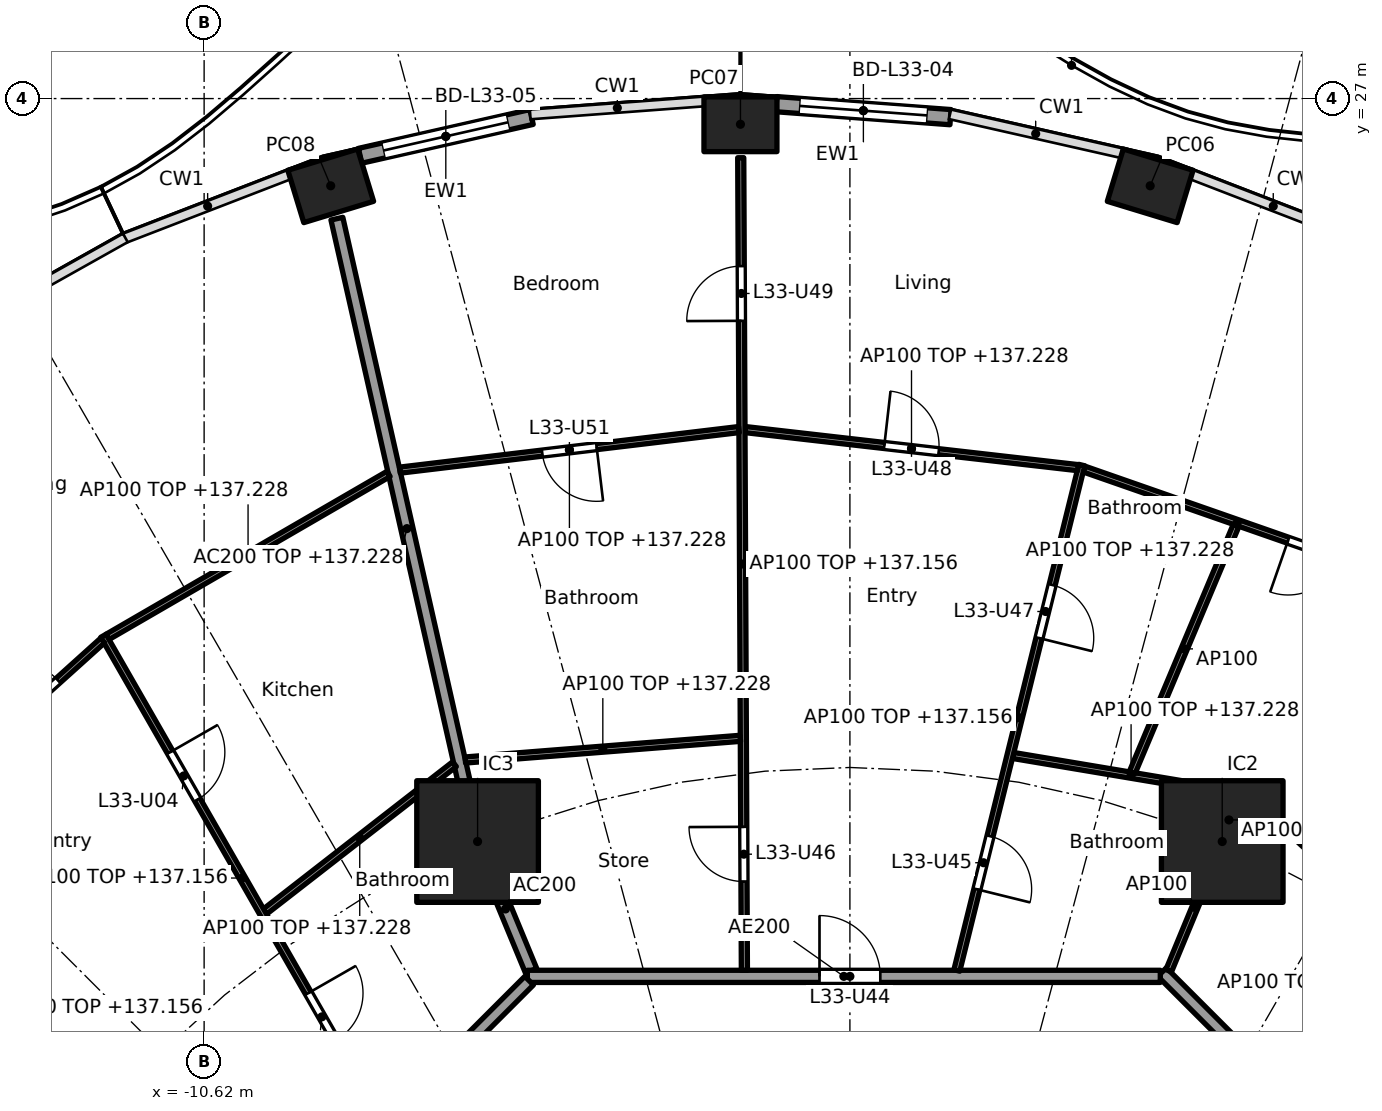
"""IFC4 building model, lengths in metres.
Left out: names, types, materials, properties, quantities, classifications, styles, units other than length and angle.
Written with IfcOpenShell. Run it as: python <this file> out.ifc"""

import sys

from ifc_helpers import new_model, si_unit, direction, frame, frame_2d, origin, origin_2d, place, context, subcontext, project, spatial, rectangle, hollow_rectangle, extrude, element, fill, save


model = new_model("IFC4")
c1 = context("Model", 3, precision=1e-05, world=origin(), true_north=direction((0.0, 1.0)))
c2 = subcontext(c1, "Body", "Model", "MODEL_VIEW")
j1 = project(units=[si_unit("LENGTHUNIT", "METRE"), si_unit("PLANEANGLEUNIT", "RADIAN")], contexts=[c1])
p1 = place(None, origin())
s1 = spatial("IfcSite", under=j1, at=p1, CompositionType="ELEMENT")
p2 = place(p1, origin())
s2 = spatial("IfcBuilding", under=s1, at=p2, CompositionType="ELEMENT")
p3 = place(p2, frame((0.0, 0.0, 134.4)))
s3 = spatial("IfcBuildingStorey", under=s2, at=p3, CompositionType="ELEMENT", Elevation=134.4)
for number, where, z_axis, x_axis in (
    (1, (4.938, 25.565, 0.0), (0.0, 0.0, 1.0), (-0.957, 0.292, 0.0)),
    (2, (-1.8, 26.577, 0.0), (0.0, 0.0, 1.0), (-1.0, 0.0, 0.0)),
    (3, (-8.538, 25.565, 0.0), (0.0, 0.0, 1.0), (-0.957, -0.292, 0.0)),
):
    element("IfcColumn", number, at=place(p3, frame(where, z_axis=z_axis, x_axis=x_axis)), inside=s3, PredefinedType="COLUMN", context=c2, shape_type="SweptSolid", body=[
        extrude(hollow_rectangle(XDim=1.2, YDim=0.9, WallThickness=0.04, at=origin_2d()), origin(), (0.0, 0.0, 1.0), 3.7),
    ])
for number, where, z_axis, x_axis in (
    (4, (6.123, 14.782, 0.0), (0.0, 0.0, 1.0), (1.0, 0.0, 0.0)),
    (5, (-6.123, 14.782, 0.0), (0.0, 0.0, 1.0), (1.0, 0.0, 0.0)),
):
    element("IfcColumn", number, at=place(p3, frame(where, z_axis=z_axis, x_axis=x_axis)), inside=s3, PredefinedType="COLUMN", context=c2, shape_type="SweptSolid", body=[
        extrude(rectangle(XDim=2.0, YDim=2.0, at=origin_2d()), origin(), (0.0, 0.0, 1.0), 3.7),
    ])
p4 = place(p3, frame((-1.211, 26.908, 0.0), z_axis=(0.0, 0.0, 1.0), x_axis=(0.997232166829, -0.074350557769, 0.0)))
e6 = element("IfcWall", 6, at=p4, inside=s3, PredefinedType="SOLIDWALL", context=c2, shape_type="SweptSolid", body=[
    extrude(rectangle(XDim=2.873, YDim=0.25, at=frame_2d((1.437, 0.0))), origin(), (0.0, 0.0, 1.0), 3.44),
])
p5 = place(p4, frame((0.386, 0.0, 0.0)))
e7 = element("IfcOpeningElement", 7, at=p5, cuts=e6, PredefinedType="OPENING", context=c2, shape_type="SweptSolid", body=[
    extrude(rectangle(XDim=2.1, YDim=2.4, at=frame_2d((1.05, 1.2))), frame((0.0, 0.135, 0.0), z_axis=(0.0, -1.0, 0.0), x_axis=(1.0, 0.0, 0.0)), (0.0, 0.0, 1.0), 0.27),
])
p6 = place(p3, frame((-8.055, 26.059, 0.0), z_axis=(0.0, 0.0, 1.0), x_axis=(0.975339035722, 0.220711951186, 0.0)))
e8 = element("IfcWall", 8, at=p6, inside=s3, PredefinedType="SOLIDWALL", context=c2, shape_type="SweptSolid", body=[
    extrude(rectangle(XDim=2.89, YDim=0.25, at=frame_2d((1.445, 0.0))), origin(), (0.0, 0.0, 1.0), 3.44),
])
p7 = place(p6, frame((0.395, 0.0, 0.0)))
e9 = element("IfcOpeningElement", 9, at=p7, cuts=e8, PredefinedType="OPENING", context=c2, shape_type="SweptSolid", body=[
    extrude(rectangle(XDim=2.1, YDim=2.4, at=frame_2d((1.05, 1.2))), frame((0.0, 0.135, 0.0), z_axis=(0.0, -1.0, 0.0), x_axis=(1.0, 0.0, 0.0)), (0.0, 0.0, 1.0), 0.27),
])
p8 = place(p3, frame((-5.243, 12.657, 0.0), z_axis=(0.0, 0.0, 1.0), x_axis=(-0.38273085373, 0.923859888513, 0.0)))
e10 = element("IfcWall", 10, at=p8, inside=s3, PredefinedType="PARTITIONING", context=c2, shape_type="SweptSolid", body=[
    extrude(rectangle(XDim=2.199, YDim=0.2, at=frame_2d((1.1, 0.0))), origin(), (0.0, 0.0, 1.0), 3.44),
])
p9 = place(p3, frame((-6.134, 14.831, 0.0), z_axis=(0.0, 0.0, 1.0), x_axis=(-0.220337590808, 0.975423675167, 0.0)))
e11 = element("IfcWall", 11, at=p9, inside=s3, PredefinedType="PARTITIONING", context=c2, shape_type="SweptSolid", body=[
    extrude(rectangle(XDim=10.451, YDim=0.2, at=frame_2d((5.226, 0.0))), origin(), (0.0, 0.0, 1.0), 2.828),
])
p10 = place(p3, frame((12.635, 5.134, 0.0), z_axis=(0.0, 0.0, 1.0), x_axis=(-0.707106781187, 0.707106781187, 0.0)))
e12 = element("IfcWall", 12, at=p10, inside=s3, PredefinedType="PARTITIONING", context=c2, shape_type="SweptSolid", body=[
    extrude(rectangle(XDim=10.609, YDim=0.2, at=frame_2d((5.305, 0.0))), origin(), (0.0, 0.0, 1.0), 3.44),
])
p11 = place(p3, frame((5.104, 12.565, 0.0), z_axis=(0.0, 0.0, 1.0), x_axis=(-1.0, 0.0, 0.0)))
e13 = element("IfcWall", 13, at=p11, inside=s3, PredefinedType="PARTITIONING", context=c2, shape_type="SweptSolid", body=[
    extrude(rectangle(XDim=10.409, YDim=0.2, at=frame_2d((5.205, 0.0))), origin(), (0.0, 0.0, 1.0), 3.44),
])
p12 = place(p11, frame((4.604, 0.0, 0.0)))
e14 = element("IfcOpeningElement", 14, at=p12, cuts=e13, PredefinedType="OPENING", context=c2, shape_type="SweptSolid", body=[
    extrude(rectangle(XDim=1.0, YDim=2.1, at=frame_2d((0.5, 1.05))), frame((0.0, 0.11, 0.0), z_axis=(0.0, -1.0, 0.0), x_axis=(1.0, 0.0, 0.0)), (0.0, 0.0, 1.0), 0.22),
])
p13 = place(p3, frame((-5.275, 12.494, 0.0), z_axis=(0.0, 0.0, 1.0), x_axis=(-0.707106781187, -0.707106781187, 0.0)))
e15 = element("IfcWall", 15, at=p13, inside=s3, PredefinedType="PARTITIONING", context=c2, shape_type="SweptSolid", body=[
    extrude(rectangle(XDim=10.209, YDim=0.2, at=frame_2d((5.104, 0.0))), origin(), (0.0, 0.0, 1.0), 3.44),
])
p14 = place(p13, frame((4.604, 0.0, 0.0)))
e16 = element("IfcOpeningElement", 16, at=p14, cuts=e15, PredefinedType="OPENING", context=c2, shape_type="SweptSolid", body=[
    extrude(rectangle(XDim=1.0, YDim=2.1, at=frame_2d((0.5, 1.05))), frame((0.0, 0.11, 0.0), z_axis=(0.0, -1.0, 0.0), x_axis=(1.0, 0.0, 0.0)), (0.0, 0.0, 1.0), 0.22),
])
p15 = place(p3, frame((11.029, 11.443, 0.0), z_axis=(0.0, 0.0, 1.0), x_axis=(-0.733121281629, 0.680097924143, 0.0)))
e17 = element("IfcWall", 17, at=p15, inside=s3, PredefinedType="PARTITIONING", context=c2, shape_type="SweptSolid", body=[
    extrude(rectangle(XDim=6.073, YDim=0.1, at=frame_2d((3.037, 0.0))), origin(), (0.0, 0.0, 1.0), 2.828),
])
p16 = place(p15, frame((3.408, 0.0, 0.0)))
e18 = element("IfcOpeningElement", 18, at=p16, cuts=e17, PredefinedType="OPENING", context=c2, shape_type="SweptSolid", body=[
    extrude(rectangle(XDim=0.9, YDim=2.1, at=frame_2d((0.45, 1.05))), frame((0.0, 0.06, 0.0), z_axis=(0.0, -1.0, 0.0), x_axis=(1.0, 0.0, 0.0)), (0.0, 0.0, 1.0), 0.12),
])
p17 = place(p3, frame((5.243, 12.657, 0.0), z_axis=(0.0, 0.0, 1.0), x_axis=(0.382719158442, 0.923864733477, 0.0)))
e19 = element("IfcWall", 19, at=p17, inside=s3, PredefinedType="PARTITIONING", context=c2, shape_type="SweptSolid", body=[
    extrude(rectangle(XDim=2.25, YDim=0.1, at=frame_2d((1.125, 0.0))), origin(), (0.0, 0.0, 1.0), 3.44),
])
p18 = place(p3, frame((6.564, 15.547, 0.0), z_axis=(0.0, 0.0, 1.0), x_axis=(-0.986269521186, 0.165143669511, 0.0)))
e20 = element("IfcWall", 20, at=p18, inside=s3, PredefinedType="PARTITIONING", context=c2, shape_type="SweptSolid", body=[
    extrude(rectangle(XDim=3.934, YDim=0.1, at=frame_2d((1.967, 0.0))), origin(), (0.0, 0.0, 1.0), 2.828),
])
p19 = place(p3, frame((8.894, 19.148, 0.0), z_axis=(0.0, 0.0, 1.0), x_axis=(-0.944182005381, 0.329424256414, 0.0)))
e21 = element("IfcWall", 21, at=p19, inside=s3, PredefinedType="PARTITIONING", context=c2, shape_type="SweptSolid", body=[
    extrude(rectangle(XDim=5.344, YDim=0.1, at=frame_2d((2.672, 0.0))), origin(), (0.0, 0.0, 1.0), 2.828),
])
p20 = place(p19, frame((0.886, 0.0, 0.0)))
e22 = element("IfcOpeningElement", 22, at=p20, cuts=e21, PredefinedType="OPENING", context=c2, shape_type="SweptSolid", body=[
    extrude(rectangle(XDim=0.9, YDim=2.1, at=frame_2d((0.45, 1.05))), frame((0.0, 0.06, 0.0), z_axis=(0.0, -1.0, 0.0), x_axis=(1.0, 0.0, 0.0)), (0.0, 0.0, 1.0), 0.12),
])
p21 = place(p3, frame((4.643, 15.918, 0.0), z_axis=(0.0, 0.0, 1.0), x_axis=(0.387539433367, 0.921853126906, 0.0)))
e23 = element("IfcWall", 23, at=p21, inside=s3, PredefinedType="PARTITIONING", context=c2, shape_type="SweptSolid", body=[
    extrude(rectangle(XDim=4.408, YDim=0.1, at=frame_2d((2.204, 0.0))), origin(), (0.0, 0.0, 1.0), 3.44),
])
p22 = place(p3, frame((1.759, 12.662, 0.0), z_axis=(0.0, 0.0, 1.0), x_axis=(0.239964949221, 0.970781552743, 0.0)))
e24 = element("IfcWall", 24, at=p22, inside=s3, PredefinedType="PARTITIONING", context=c2, shape_type="SweptSolid", body=[
    extrude(rectangle(XDim=8.562, YDim=0.1, at=frame_2d((4.281, 0.0))), origin(), (0.0, 0.0, 1.0), 2.756),
])
p23 = place(p22, frame((1.375, 0.0, 0.0)))
e25 = element("IfcOpeningElement", 25, at=p23, cuts=e24, PredefinedType="OPENING", context=c2, shape_type="SweptSolid", body=[
    extrude(rectangle(XDim=0.9, YDim=2.1, at=frame_2d((0.45, 1.05))), frame((0.0, 0.06, 0.0), z_axis=(0.0, -1.0, 0.0), x_axis=(1.0, 0.0, 0.0)), (0.0, 0.0, 1.0), 0.12),
])
p24 = place(p22, frame((5.631, 0.0, 0.0)))
e26 = element("IfcOpeningElement", 26, at=p24, cuts=e24, PredefinedType="OPENING", context=c2, shape_type="SweptSolid", body=[
    extrude(rectangle(XDim=0.9, YDim=2.1, at=frame_2d((0.45, 1.05))), frame((0.0, 0.06, 0.0), z_axis=(0.0, -1.0, 0.0), x_axis=(1.0, 0.0, 0.0)), (0.0, 0.0, 1.0), 0.12),
])
p25 = place(p3, frame((3.751, 20.93, 0.0), z_axis=(0.0, 0.0, 1.0), x_axis=(-0.993522105273, 0.113639017658, 0.0)))
e27 = element("IfcWall", 27, at=p25, inside=s3, PredefinedType="PARTITIONING", context=c2, shape_type="SweptSolid", body=[
    extrude(rectangle(XDim=5.513, YDim=0.1, at=frame_2d((2.756, 0.0))), origin(), (0.0, 0.0, 1.0), 2.828),
])
p26 = place(p25, frame((2.306, 0.0, 0.0)))
e28 = element("IfcOpeningElement", 28, at=p26, cuts=e27, PredefinedType="OPENING", context=c2, shape_type="SweptSolid", body=[
    extrude(rectangle(XDim=0.9, YDim=2.1, at=frame_2d((0.45, 1.05))), frame((0.0, 0.06, 0.0), z_axis=(0.0, -1.0, 0.0), x_axis=(1.0, 0.0, 0.0)), (0.0, 0.0, 1.0), 0.12),
])
p27 = place(p3, frame((-1.735, 12.665, 0.0), z_axis=(0.0, 0.0, 1.0), x_axis=(-0.004494500855, 0.99998989968, 0.0)))
e29 = element("IfcWall", 29, at=p27, inside=s3, PredefinedType="PARTITIONING", context=c2, shape_type="SweptSolid", body=[
    extrude(rectangle(XDim=13.363, YDim=0.1, at=frame_2d((6.681, 0.0))), origin(), (0.0, 0.0, 1.0), 2.756),
])
p28 = place(p27, frame((1.459, 0.0, 0.0)))
e30 = element("IfcOpeningElement", 30, at=p28, cuts=e29, PredefinedType="OPENING", context=c2, shape_type="SweptSolid", body=[
    extrude(rectangle(XDim=0.9, YDim=2.1, at=frame_2d((0.45, 1.05))), frame((0.0, 0.06, 0.0), z_axis=(0.0, -1.0, 0.0), x_axis=(1.0, 0.0, 0.0)), (0.0, 0.0, 1.0), 0.12),
])
p29 = place(p27, frame((10.68, 0.0, 0.0)))
e31 = element("IfcOpeningElement", 31, at=p29, cuts=e29, PredefinedType="OPENING", context=c2, shape_type="SweptSolid", body=[
    extrude(rectangle(XDim=0.9, YDim=2.1, at=frame_2d((0.45, 1.05))), frame((0.0, 0.06, 0.0), z_axis=(0.0, -1.0, 0.0), x_axis=(1.0, 0.0, 0.0)), (0.0, 0.0, 1.0), 0.12),
])
p30 = place(p3, frame((-1.802, 16.479, 0.0), z_axis=(0.0, 0.0, 1.0), x_axis=(-0.996907698294, -0.078581429625, 0.0)))
e32 = element("IfcWall", 32, at=p30, inside=s3, PredefinedType="PARTITIONING", context=c2, shape_type="SweptSolid", body=[
    extrude(rectangle(XDim=4.536, YDim=0.1, at=frame_2d((2.268, 0.0))), origin(), (0.0, 0.0, 1.0), 2.828),
])
p31 = place(p3, frame((-1.825, 21.557, 0.0), z_axis=(0.0, 0.0, 1.0), x_axis=(-0.992915053711, -0.11882632753, 0.0)))
e33 = element("IfcWall", 33, at=p31, inside=s3, PredefinedType="PARTITIONING", context=c2, shape_type="SweptSolid", body=[
    extrude(rectangle(XDim=5.615, YDim=0.1, at=frame_2d((2.808, 0.0))), origin(), (0.0, 0.0, 1.0), 2.828),
])
p32 = place(p31, frame((2.358, 0.0, 0.0)))
e34 = element("IfcOpeningElement", 34, at=p32, cuts=e33, PredefinedType="OPENING", context=c2, shape_type="SweptSolid", body=[
    extrude(rectangle(XDim=0.9, YDim=2.1, at=frame_2d((0.45, 1.05))), frame((0.0, 0.06, 0.0), z_axis=(0.0, -1.0, 0.0), x_axis=(1.0, 0.0, 0.0)), (0.0, 0.0, 1.0), 0.12),
])
p33 = place(p3, frame((-6.503, 16.054, 0.0), z_axis=(0.0, 0.0, 1.0), x_axis=(-0.789428807693, -0.613842127574, 0.0)))
e35 = element("IfcWall", 35, at=p33, inside=s3, PredefinedType="PARTITIONING", context=c2, shape_type="SweptSolid", body=[
    extrude(rectangle(XDim=3.948, YDim=0.1, at=frame_2d((1.974, 0.0))), origin(), (0.0, 0.0, 1.0), 2.828),
])
p34 = place(p3, frame((-7.586, 20.827, 0.0), z_axis=(0.0, 0.0, 1.0), x_axis=(-0.865093450578, -0.501610727325, 0.0)))
e36 = element("IfcWall", 36, at=p34, inside=s3, PredefinedType="PARTITIONING", context=c2, shape_type="SweptSolid", body=[
    extrude(rectangle(XDim=5.343, YDim=0.1, at=frame_2d((2.671, 0.0))), origin(), (0.0, 0.0, 1.0), 2.828),
])
p35 = place(p3, frame((-7.708, 10.198, 0.0), z_axis=(0.0, 0.0, 1.0), x_axis=(-0.497449462689, 0.867492957937, 0.0)))
e37 = element("IfcWall", 37, at=p35, inside=s3, PredefinedType="PARTITIONING", context=c2, shape_type="SweptSolid", body=[
    extrude(rectangle(XDim=9.185, YDim=0.1, at=frame_2d((4.592, 0.0))), origin(), (0.0, 0.0, 1.0), 2.756),
])
p36 = place(p35, frame((1.511, 0.0, 0.0)))
e38 = element("IfcOpeningElement", 38, at=p36, cuts=e37, PredefinedType="OPENING", context=c2, shape_type="SweptSolid", body=[
    extrude(rectangle(XDim=0.9, YDim=2.1, at=frame_2d((0.45, 1.05))), frame((0.0, 0.06, 0.0), z_axis=(0.0, -1.0, 0.0), x_axis=(1.0, 0.0, 0.0)), (0.0, 0.0, 1.0), 0.12),
])
p37 = place(p35, frame((6.078, 0.0, 0.0)))
e39 = element("IfcOpeningElement", 39, at=p37, cuts=e37, PredefinedType="OPENING", context=c2, shape_type="SweptSolid", body=[
    extrude(rectangle(XDim=0.9, YDim=2.1, at=frame_2d((0.45, 1.05))), frame((0.0, 0.06, 0.0), z_axis=(0.0, -1.0, 0.0), x_axis=(1.0, 0.0, 0.0)), (0.0, 0.0, 1.0), 0.12),
])
p38 = place(p3, frame((-12.289, 18.089, 0.0), z_axis=(0.0, 0.0, 1.0), x_axis=(-0.743146066164, -0.669129228435, 0.0)))
e40 = element("IfcWall", 40, at=p38, inside=s3, PredefinedType="PARTITIONING", context=c2, shape_type="SweptSolid", body=[
    extrude(rectangle(XDim=5.739, YDim=0.1, at=frame_2d((2.87, 0.0))), origin(), (0.0, 0.0, 1.0), 2.828),
])
p39 = place(p38, frame((0.985, 0.0, 0.0)))
e41 = element("IfcOpeningElement", 41, at=p39, cuts=e40, PredefinedType="OPENING", context=c2, shape_type="SweptSolid", body=[
    extrude(rectangle(XDim=0.9, YDim=2.1, at=frame_2d((0.45, 1.05))), frame((0.0, 0.06, 0.0), z_axis=(0.0, -1.0, 0.0), x_axis=(1.0, 0.0, 0.0)), (0.0, 0.0, 1.0), 0.12),
])
p40 = place(p3, frame((-10.182, 7.729, 0.0), z_axis=(0.0, 0.0, 1.0), x_axis=(-0.702927211734, 0.711261790766, 0.0)))
e42 = element("IfcWall", 42, at=p40, inside=s3, PredefinedType="PARTITIONING", context=c2, shape_type="SweptSolid", body=[
    extrude(rectangle(XDim=9.168, YDim=0.1, at=frame_2d((4.584, 0.0))), origin(), (0.0, 0.0, 1.0), 2.756),
])
p41 = place(p40, frame((1.507, 0.0, 0.0)))
e43 = element("IfcOpeningElement", 43, at=p41, cuts=e42, PredefinedType="OPENING", context=c2, shape_type="SweptSolid", body=[
    extrude(rectangle(XDim=0.9, YDim=2.1, at=frame_2d((0.45, 1.05))), frame((0.0, 0.06, 0.0), z_axis=(0.0, -1.0, 0.0), x_axis=(1.0, 0.0, 0.0)), (0.0, 0.0, 1.0), 0.12),
])
p42 = place(p40, frame((6.067, 0.0, 0.0)))
e44 = element("IfcOpeningElement", 44, at=p42, cuts=e42, PredefinedType="OPENING", context=c2, shape_type="SweptSolid", body=[
    extrude(rectangle(XDim=0.9, YDim=2.1, at=frame_2d((0.45, 1.05))), frame((0.0, 0.06, 0.0), z_axis=(0.0, -1.0, 0.0), x_axis=(1.0, 0.0, 0.0)), (0.0, 0.0, 1.0), 0.12),
])
p43 = place(p3, frame((6.417, 15.42, 0.0), z_axis=(0.0, 0.0, 1.0), x_axis=(-0.543777264953, -0.839229578911, 0.0)))
e45 = element("IfcWall", 45, at=p43, inside=s3, PredefinedType="PARTITIONING", context=c2, shape_type="SweptSolid", body=[
    extrude(rectangle(XDim=0.673, YDim=0.1, at=frame_2d((0.337, 0.0))), origin(), (0.0, 0.0, 1.0), 3.44),
])
p44 = place(p5, origin())
e46 = element("IfcDoor", 46, at=p44, inside=s3, OperationType="SLIDING_TO_LEFT", PredefinedType="DOOR", context=c2, shape_type="SweptSolid", body=[
    extrude(rectangle(XDim=2.1, YDim=2.4, at=frame_2d((1.05, 1.2))), frame((0.0, 0.025, 0.0), z_axis=(0.0, -1.0, 0.0), x_axis=(1.0, 0.0, 0.0)), (0.0, 0.0, 1.0), 0.05),
])
fill(e7, e46)
p45 = place(p7, origin())
e47 = element("IfcDoor", 47, at=p45, inside=s3, OperationType="SLIDING_TO_LEFT", PredefinedType="DOOR", context=c2, shape_type="SweptSolid", body=[
    extrude(rectangle(XDim=2.1, YDim=2.4, at=frame_2d((1.05, 1.2))), frame((0.0, 0.025, 0.0), z_axis=(0.0, -1.0, 0.0), x_axis=(1.0, 0.0, 0.0)), (0.0, 0.0, 1.0), 0.05),
])
fill(e9, e47)
p46 = place(p36, frame((0.9, 0.0, 0.0), x_axis=(-1.0, 0.0, 0.0)))
e48 = element("IfcDoor", 48, at=p46, inside=s3, OperationType="SINGLE_SWING_LEFT", PredefinedType="DOOR", context=c2, shape_type="SweptSolid", body=[
    extrude(rectangle(XDim=0.9, YDim=2.1, at=frame_2d((0.45, 1.05))), frame((0.0, 0.025, 0.0), z_axis=(0.0, -1.0, 0.0), x_axis=(1.0, 0.0, 0.0)), (0.0, 0.0, 1.0), 0.05),
])
fill(e38, e48)
p47 = place(p37, frame((0.9, 0.0, 0.0), x_axis=(-1.0, 0.0, 0.0)))
e49 = element("IfcDoor", 49, at=p47, inside=s3, OperationType="SINGLE_SWING_LEFT", PredefinedType="DOOR", context=c2, shape_type="SweptSolid", body=[
    extrude(rectangle(XDim=0.9, YDim=2.1, at=frame_2d((0.45, 1.05))), frame((0.0, 0.025, 0.0), z_axis=(0.0, -1.0, 0.0), x_axis=(1.0, 0.0, 0.0)), (0.0, 0.0, 1.0), 0.05),
])
fill(e39, e49)
p48 = place(p39, frame((0.9, 0.0, 0.0), x_axis=(-1.0, 0.0, 0.0)))
e50 = element("IfcDoor", 50, at=p48, inside=s3, OperationType="SINGLE_SWING_LEFT", PredefinedType="DOOR", context=c2, shape_type="SweptSolid", body=[
    extrude(rectangle(XDim=0.9, YDim=2.1, at=frame_2d((0.45, 1.05))), frame((0.0, 0.025, 0.0), z_axis=(0.0, -1.0, 0.0), x_axis=(1.0, 0.0, 0.0)), (0.0, 0.0, 1.0), 0.05),
])
fill(e41, e50)
p49 = place(p12, frame((1.0, 0.0, 0.0), x_axis=(-1.0, 0.0, 0.0)))
e51 = element("IfcDoor", 51, at=p49, inside=s3, OperationType="SINGLE_SWING_LEFT", PredefinedType="DOOR", context=c2, shape_type="SweptSolid", body=[
    extrude(rectangle(XDim=1.0, YDim=2.1, at=frame_2d((0.5, 1.05))), frame((0.0, 0.025, 0.0), z_axis=(0.0, -1.0, 0.0), x_axis=(1.0, 0.0, 0.0)), (0.0, 0.0, 1.0), 0.05),
])
fill(e14, e51)
p50 = place(p23, frame((0.9, 0.0, 0.0), x_axis=(-1.0, 0.0, 0.0)))
e52 = element("IfcDoor", 52, at=p50, inside=s3, OperationType="SINGLE_SWING_RIGHT", PredefinedType="DOOR", context=c2, shape_type="SweptSolid", body=[
    extrude(rectangle(XDim=0.9, YDim=2.1, at=frame_2d((0.45, 1.05))), frame((0.0, 0.025, 0.0), z_axis=(0.0, -1.0, 0.0), x_axis=(1.0, 0.0, 0.0)), (0.0, 0.0, 1.0), 0.05),
])
fill(e25, e52)
p51 = place(p28, origin())
e53 = element("IfcDoor", 53, at=p51, inside=s3, OperationType="SINGLE_SWING_RIGHT", PredefinedType="DOOR", context=c2, shape_type="SweptSolid", body=[
    extrude(rectangle(XDim=0.9, YDim=2.1, at=frame_2d((0.45, 1.05))), frame((0.0, 0.025, 0.0), z_axis=(0.0, -1.0, 0.0), x_axis=(1.0, 0.0, 0.0)), (0.0, 0.0, 1.0), 0.05),
])
fill(e30, e53)
p52 = place(p24, frame((0.9, 0.0, 0.0), x_axis=(-1.0, 0.0, 0.0)))
e54 = element("IfcDoor", 54, at=p52, inside=s3, OperationType="SINGLE_SWING_RIGHT", PredefinedType="DOOR", context=c2, shape_type="SweptSolid", body=[
    extrude(rectangle(XDim=0.9, YDim=2.1, at=frame_2d((0.45, 1.05))), frame((0.0, 0.025, 0.0), z_axis=(0.0, -1.0, 0.0), x_axis=(1.0, 0.0, 0.0)), (0.0, 0.0, 1.0), 0.05),
])
fill(e26, e54)
p53 = place(p26, frame((0.9, 0.0, 0.0), x_axis=(-1.0, 0.0, 0.0)))
e55 = element("IfcDoor", 55, at=p53, inside=s3, OperationType="SINGLE_SWING_LEFT", PredefinedType="DOOR", context=c2, shape_type="SweptSolid", body=[
    extrude(rectangle(XDim=0.9, YDim=2.1, at=frame_2d((0.45, 1.05))), frame((0.0, 0.025, 0.0), z_axis=(0.0, -1.0, 0.0), x_axis=(1.0, 0.0, 0.0)), (0.0, 0.0, 1.0), 0.05),
])
fill(e28, e55)
p54 = place(p29, origin())
e56 = element("IfcDoor", 56, at=p54, inside=s3, OperationType="SINGLE_SWING_LEFT", PredefinedType="DOOR", context=c2, shape_type="SweptSolid", body=[
    extrude(rectangle(XDim=0.9, YDim=2.1, at=frame_2d((0.45, 1.05))), frame((0.0, 0.025, 0.0), z_axis=(0.0, -1.0, 0.0), x_axis=(1.0, 0.0, 0.0)), (0.0, 0.0, 1.0), 0.05),
])
fill(e31, e56)
p55 = place(p20, origin())
e57 = element("IfcDoor", 57, at=p55, inside=s3, OperationType="SINGLE_SWING_RIGHT", PredefinedType="DOOR", context=c2, shape_type="SweptSolid", body=[
    extrude(rectangle(XDim=0.9, YDim=2.1, at=frame_2d((0.45, 1.05))), frame((0.0, 0.025, 0.0), z_axis=(0.0, -1.0, 0.0), x_axis=(1.0, 0.0, 0.0)), (0.0, 0.0, 1.0), 0.05),
])
fill(e22, e57)
p56 = place(p32, origin())
e58 = element("IfcDoor", 58, at=p56, inside=s3, OperationType="SINGLE_SWING_LEFT", PredefinedType="DOOR", context=c2, shape_type="SweptSolid", body=[
    extrude(rectangle(XDim=0.9, YDim=2.1, at=frame_2d((0.45, 1.05))), frame((0.0, 0.025, 0.0), z_axis=(0.0, -1.0, 0.0), x_axis=(1.0, 0.0, 0.0)), (0.0, 0.0, 1.0), 0.05),
])
fill(e34, e58)
save(model, sys.argv[1])
